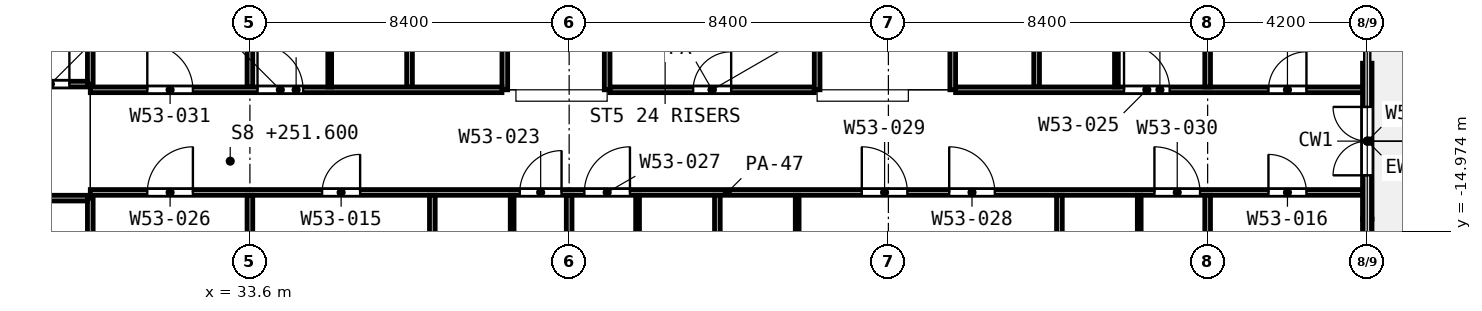
"""IFC4 building model, lengths in metres.
Left out: names, types, materials, properties, quantities, classifications, styles, units other than length and angle.
Written with IfcOpenShell. Run it as: python <this file> out.ifc"""

import sys

from ifc_helpers import new_model, si_unit, direction, frame, frame_2d, origin, place, context, subcontext, project, spatial, rectangle, extrude, element, fill, save


model = new_model("IFC4")
c1 = context("Model", 3, precision=1e-05, world=origin(), true_north=direction((0.0, 1.0)))
c2 = subcontext(c1, "Body", "Model", "MODEL_VIEW")
j1 = project(units=[si_unit("LENGTHUNIT", "METRE"), si_unit("PLANEANGLEUNIT", "RADIAN")], contexts=[c1])
p1 = place(None, origin())
s1 = spatial("IfcSite", under=j1, at=p1, CompositionType="ELEMENT")
p2 = place(p1, origin())
s2 = spatial("IfcBuilding", under=s1, at=p2, CompositionType="ELEMENT")
p3 = place(p2, frame((0.0, 0.0, 251.6)))
s3 = spatial("IfcBuildingStorey", under=s2, at=p3, CompositionType="ELEMENT", Elevation=251.6)
p4 = place(p3, frame((63.0, -18.75, 0.0), z_axis=(0.0, 0.0, 1.0), x_axis=(0.0, 1.0, 0.0)))
e1 = element("IfcWall", 1, at=p4, inside=s3, PredefinedType="SOLIDWALL", context=c2, shape_type="SweptSolid", body=[
    extrude(rectangle(XDim=4.1, YDim=0.25, at=frame_2d((2.05, 0.0))), origin(), (0.0, 0.0, 1.0), 2.58),
])
p5 = place(p4, frame((1.15, 0.0, 0.0)))
e2 = element("IfcOpeningElement", 2, at=p5, cuts=e1, PredefinedType="OPENING", context=c2, shape_type="SweptSolid", body=[
    extrude(rectangle(XDim=1.8, YDim=2.1, at=frame_2d((0.9, 1.05))), frame((0.0, 0.135, 0.0), z_axis=(0.0, -1.0, 0.0), x_axis=(1.0, 0.0, 0.0)), (0.0, 0.0, 1.0), 0.27),
])
p6 = place(p3, frame((63.0, -14.65, 0.0), z_axis=(0.0, 0.0, 1.0), x_axis=(0.0, 1.0, 0.0)))
e3 = element("IfcWall", 3, at=p6, inside=s3, PredefinedType="SOLIDWALL", context=c2, shape_type="SweptSolid", body=[
    extrude(rectangle(XDim=4.1, YDim=0.25, at=frame_2d((2.05, 0.0))), origin(), (0.0, 0.0, 1.0), 2.58),
])
p7 = place(p6, frame((1.15, 0.0, 0.0)))
e4 = element("IfcOpeningElement", 4, at=p7, cuts=e3, PredefinedType="OPENING", context=c2, shape_type="SweptSolid", body=[
    extrude(rectangle(XDim=1.8, YDim=2.1, at=frame_2d((0.9, 1.05))), frame((0.0, 0.135, 0.0), z_axis=(0.0, -1.0, 0.0), x_axis=(1.0, 0.0, 0.0)), (0.0, 0.0, 1.0), 0.27),
])
for number, where, z_axis, x_axis in (
    (5, (35.7, -11.175, 0.0), (0.0, 0.0, 1.0), (0.0, 1.0, 0.0)),
    (6, (40.5, -16.65, 0.0), (0.0, 0.0, 1.0), (0.0, 1.0, 0.0)),
    (7, (43.8, -16.65, 0.0), (0.0, 0.0, 1.0), (0.0, 1.0, 0.0)),
    (8, (48.0, -16.65, 0.0), (0.0, 0.0, 1.0), (0.0, 1.0, 0.0)),
    (9, (56.4, -11.175, 0.0), (0.0, 0.0, 1.0), (0.0, 1.0, 0.0)),
    (10, (57.0, -16.65, 0.0), (0.0, 0.0, 1.0), (0.0, 1.0, 0.0)),
):
    element("IfcWall", number, at=place(p3, frame(where, z_axis=z_axis, x_axis=x_axis)), inside=s3, PredefinedType="PARTITIONING", context=c2, shape_type="SweptSolid", body=[
        extrude(rectangle(XDim=2.625, YDim=0.1, at=frame_2d((1.312, 0.0))), origin(), (0.0, 0.0, 1.0), 3.6),
    ])
p8 = place(p3, frame((24.8, -14.1, 0.0), z_axis=(0.0, 0.0, 1.0), x_axis=(1.0, 0.0, 0.0)))
e11 = element("IfcWall", 11, at=p8, inside=s3, PredefinedType="PARTITIONING", context=c2, shape_type="SweptSolid", body=[
    extrude(rectangle(XDim=4.525, YDim=0.15, at=frame_2d((2.262, 0.0))), origin(), (0.0, 0.0, 1.0), 3.6),
])
p9 = place(p8, frame((1.75, 0.0, 0.0)))
e12 = element("IfcOpeningElement", 12, at=p9, cuts=e11, PredefinedType="OPENING", context=c2, shape_type="SweptSolid", body=[
    extrude(rectangle(XDim=1.5, YDim=2.1, at=frame_2d((0.75, 1.05))), frame((0.0, 0.085, 0.0), z_axis=(0.0, -1.0, 0.0), x_axis=(1.0, 0.0, 0.0)), (0.0, 0.0, 1.0), 0.17),
])
p10 = place(p3, frame((29.4, -13.95, 0.0), z_axis=(0.0, 0.0, 1.0), x_axis=(1.0, 0.0, 0.0)))
e13 = element("IfcWall", 13, at=p10, inside=s3, PredefinedType="PARTITIONING", context=c2, shape_type="SweptSolid", body=[
    extrude(rectangle(XDim=33.52, YDim=0.15, at=frame_2d((16.76, 0.0))), origin(), (0.0, 0.0, 1.0), 2.7),
])
p11 = place(p10, frame((1.5, 0.0, 0.0)))
e14 = element("IfcOpeningElement", 14, at=p11, cuts=e13, PredefinedType="OPENING", context=c2, shape_type="SweptSolid", body=[
    extrude(rectangle(XDim=1.2, YDim=2.1, at=frame_2d((0.6, 1.05))), frame((0.0, 0.085, 0.0), z_axis=(0.0, -1.0, 0.0), x_axis=(1.0, 0.0, 0.0)), (0.0, 0.0, 1.0), 0.17),
])
p12 = place(p10, frame((6.1, 0.0, 0.0)))
e15 = element("IfcOpeningElement", 15, at=p12, cuts=e13, PredefinedType="OPENING", context=c2, shape_type="SweptSolid", body=[
    extrude(rectangle(XDim=1.0, YDim=2.1, at=frame_2d((0.5, 1.05))), frame((0.0, 0.085, 0.0), z_axis=(0.0, -1.0, 0.0), x_axis=(1.0, 0.0, 0.0)), (0.0, 0.0, 1.0), 0.17),
])
p13 = place(p10, frame((11.3, 0.0, 0.0)))
e16 = element("IfcOpeningElement", 16, at=p13, cuts=e13, PredefinedType="OPENING", context=c2, shape_type="SweptSolid", body=[
    extrude(rectangle(XDim=1.1, YDim=2.1, at=frame_2d((0.55, 1.05))), frame((0.0, 0.085, 0.0), z_axis=(0.0, -1.0, 0.0), x_axis=(1.0, 0.0, 0.0)), (0.0, 0.0, 1.0), 0.17),
])
p14 = place(p10, frame((13.0, 0.0, 0.0)))
e17 = element("IfcOpeningElement", 17, at=p14, cuts=e13, PredefinedType="OPENING", context=c2, shape_type="SweptSolid", body=[
    extrude(rectangle(XDim=1.2, YDim=2.1, at=frame_2d((0.6, 1.05))), frame((0.0, 0.085, 0.0), z_axis=(0.0, -1.0, 0.0), x_axis=(1.0, 0.0, 0.0)), (0.0, 0.0, 1.0), 0.17),
])
p15 = place(p10, frame((22.6, 0.0, 0.0)))
e18 = element("IfcOpeningElement", 18, at=p15, cuts=e13, PredefinedType="OPENING", context=c2, shape_type="SweptSolid", body=[
    extrude(rectangle(XDim=1.2, YDim=2.1, at=frame_2d((0.6, 1.05))), frame((0.0, 0.085, 0.0), z_axis=(0.0, -1.0, 0.0), x_axis=(1.0, 0.0, 0.0)), (0.0, 0.0, 1.0), 0.17),
])
p16 = place(p10, frame((20.3, 0.0, 0.0)))
e19 = element("IfcOpeningElement", 19, at=p16, cuts=e13, PredefinedType="OPENING", context=c2, shape_type="SweptSolid", body=[
    extrude(rectangle(XDim=1.2, YDim=2.1, at=frame_2d((0.6, 1.05))), frame((0.0, 0.085, 0.0), z_axis=(0.0, -1.0, 0.0), x_axis=(1.0, 0.0, 0.0)), (0.0, 0.0, 1.0), 0.17),
])
p17 = place(p10, frame((28.0, 0.0, 0.0)))
e20 = element("IfcOpeningElement", 20, at=p17, cuts=e13, PredefinedType="OPENING", context=c2, shape_type="SweptSolid", body=[
    extrude(rectangle(XDim=1.2, YDim=2.1, at=frame_2d((0.6, 1.05))), frame((0.0, 0.085, 0.0), z_axis=(0.0, -1.0, 0.0), x_axis=(1.0, 0.0, 0.0)), (0.0, 0.0, 1.0), 0.17),
])
p18 = place(p10, frame((31.0, 0.0, 0.0)))
e21 = element("IfcOpeningElement", 21, at=p18, cuts=e13, PredefinedType="OPENING", context=c2, shape_type="SweptSolid", body=[
    extrude(rectangle(XDim=1.0, YDim=2.1, at=frame_2d((0.5, 1.05))), frame((0.0, 0.085, 0.0), z_axis=(0.0, -1.0, 0.0), x_axis=(1.0, 0.0, 0.0)), (0.0, 0.0, 1.0), 0.17),
])
p19 = place(p3, frame((29.4, -11.25, 0.0), z_axis=(0.0, 0.0, 1.0), x_axis=(1.0, 0.0, 0.0)))
e22 = element("IfcWall", 22, at=p19, inside=s3, PredefinedType="PARTITIONING", context=c2, shape_type="SweptSolid", body=[
    extrude(rectangle(XDim=10.832, YDim=0.15, at=frame_2d((5.416, 0.0))), origin(), (0.0, 0.0, 1.0), 3.6),
])
p20 = place(p19, frame((4.4, 0.0, 0.0)))
e23 = element("IfcOpeningElement", 23, at=p20, cuts=e22, PredefinedType="OPENING", context=c2, shape_type="SweptSolid", body=[
    extrude(rectangle(XDim=1.2, YDim=2.1, at=frame_2d((0.6, 1.05))), frame((0.0, 0.085, 0.0), z_axis=(0.0, -1.0, 0.0), x_axis=(1.0, 0.0, 0.0)), (0.0, 0.0, 1.0), 0.17),
])
p21 = place(p19, frame((1.5, 0.0, 0.0)))
e24 = element("IfcOpeningElement", 24, at=p21, cuts=e22, PredefinedType="OPENING", context=c2, shape_type="SweptSolid", body=[
    extrude(rectangle(XDim=1.2, YDim=2.1, at=frame_2d((0.6, 1.05))), frame((0.0, 0.085, 0.0), z_axis=(0.0, -1.0, 0.0), x_axis=(1.0, 0.0, 0.0)), (0.0, 0.0, 1.0), 0.17),
])
p22 = place(p3, frame((43.075, -11.25, 0.0), z_axis=(0.0, 0.0, 1.0), x_axis=(1.0, 0.0, 0.0)))
e25 = element("IfcWall", 25, at=p22, inside=s3, PredefinedType="PARTITIONING", context=c2, shape_type="SweptSolid", body=[
    extrude(rectangle(XDim=5.375, YDim=0.15, at=frame_2d((2.688, 0.0))), origin(), (0.0, 0.0, 1.0), 3.6),
])
p23 = place(p22, frame((2.188, 0.0, 0.0)))
e26 = element("IfcOpeningElement", 26, at=p23, cuts=e25, PredefinedType="OPENING", context=c2, shape_type="SweptSolid", body=[
    extrude(rectangle(XDim=1.0, YDim=2.1, at=frame_2d((0.5, 1.05))), frame((0.0, 0.085, 0.0), z_axis=(0.0, -1.0, 0.0), x_axis=(1.0, 0.0, 0.0)), (0.0, 0.0, 1.0), 0.17),
])
p24 = place(p3, frame((52.168, -11.25, 0.0), z_axis=(0.0, 0.0, 1.0), x_axis=(1.0, 0.0, 0.0)))
e27 = element("IfcWall", 27, at=p24, inside=s3, PredefinedType="PARTITIONING", context=c2, shape_type="SweptSolid", body=[
    extrude(rectangle(XDim=10.752, YDim=0.15, at=frame_2d((5.376, 0.0))), origin(), (0.0, 0.0, 1.0), 2.7),
])
p25 = place(p24, frame((4.432, 0.0, 0.0)))
e28 = element("IfcOpeningElement", 28, at=p25, cuts=e27, PredefinedType="OPENING", context=c2, shape_type="SweptSolid", body=[
    extrude(rectangle(XDim=1.2, YDim=2.1, at=frame_2d((0.6, 1.05))), frame((0.0, 0.085, 0.0), z_axis=(0.0, -1.0, 0.0), x_axis=(1.0, 0.0, 0.0)), (0.0, 0.0, 1.0), 0.17),
])
p26 = place(p24, frame((8.232, 0.0, 0.0)))
e29 = element("IfcOpeningElement", 29, at=p26, cuts=e27, PredefinedType="OPENING", context=c2, shape_type="SweptSolid", body=[
    extrude(rectangle(XDim=1.0, YDim=2.1, at=frame_2d((0.5, 1.05))), frame((0.0, 0.085, 0.0), z_axis=(0.0, -1.0, 0.0), x_axis=(1.0, 0.0, 0.0)), (0.0, 0.0, 1.0), 0.17),
])
p27 = place(p3, frame((24.8, -11.1, 0.0), z_axis=(0.0, 0.0, 1.0), x_axis=(1.0, 0.0, 0.0)))
e30 = element("IfcWall", 30, at=p27, inside=s3, PredefinedType="PARTITIONING", context=c2, shape_type="SweptSolid", body=[
    extrude(rectangle(XDim=4.525, YDim=0.15, at=frame_2d((2.262, 0.0))), origin(), (0.0, 0.0, 1.0), 3.6),
])
p28 = place(p27, frame((1.0, 0.0, 0.0)))
e31 = element("IfcOpeningElement", 31, at=p28, cuts=e30, PredefinedType="OPENING", context=c2, shape_type="SweptSolid", body=[
    extrude(rectangle(XDim=0.9, YDim=2.1, at=frame_2d((0.45, 1.05))), frame((0.0, 0.085, 0.0), z_axis=(0.0, -1.0, 0.0), x_axis=(1.0, 0.0, 0.0)), (0.0, 0.0, 1.0), 0.17),
])
p29 = place(p27, frame((3.05, 0.0, 0.0)))
e32 = element("IfcOpeningElement", 32, at=p29, cuts=e30, PredefinedType="OPENING", context=c2, shape_type="SweptSolid", body=[
    extrude(rectangle(XDim=1.0, YDim=2.1, at=frame_2d((0.5, 1.05))), frame((0.0, 0.085, 0.0), z_axis=(0.0, -1.0, 0.0), x_axis=(1.0, 0.0, 0.0)), (0.0, 0.0, 1.0), 0.17),
])
p30 = place(p3, frame((29.4, -25.2, 0.0), z_axis=(0.0, 0.0, 1.0), x_axis=(0.0, 1.0, 0.0)))
e33 = element("IfcWall", 33, at=p30, inside=s3, PredefinedType="PARTITIONING", context=c2, shape_type="SweptSolid", body=[
    extrude(rectangle(XDim=11.1, YDim=0.15, at=frame_2d((5.55, 0.0))), origin(), (0.0, 0.0, 1.0), 3.6),
])
p31 = place(p3, frame((29.4, -11.1, 0.0), z_axis=(0.0, 0.0, 1.0), x_axis=(0.0, 1.0, 0.0)))
e34 = element("IfcWall", 34, at=p31, inside=s3, PredefinedType="PARTITIONING", context=c2, shape_type="SweptSolid", body=[
    extrude(rectangle(XDim=11.02, YDim=0.15, at=frame_2d((5.51, 0.0))), origin(), (0.0, 0.0, 1.0), 3.6),
])
p32 = place(p3, frame((33.6, -25.12, 0.0), z_axis=(0.0, 0.0, 1.0), x_axis=(0.0, 1.0, 0.0)))
e35 = element("IfcWall", 35, at=p32, inside=s3, PredefinedType="PARTITIONING", context=c2, shape_type="SweptSolid", body=[
    extrude(rectangle(XDim=11.095, YDim=0.15, at=frame_2d((5.548, 0.0))), origin(), (0.0, 0.0, 1.0), 3.6),
])
for number, where, z_axis, x_axis in (
    (36, (33.6, -11.175, 0.0), (0.0, 0.0, 1.0), (0.0, 1.0, 0.0)),
    (37, (37.8, -11.175, 0.0), (0.0, 0.0, 1.0), (0.0, 1.0, 0.0)),
):
    element("IfcWall", number, at=place(p3, frame(where, z_axis=z_axis, x_axis=x_axis)), inside=s3, PredefinedType="PARTITIONING", context=c2, shape_type="SweptSolid", body=[
        extrude(rectangle(XDim=11.095, YDim=0.15, at=frame_2d((5.547, 0.0))), origin(), (0.0, 0.0, 1.0), 3.6),
    ])
p33 = place(p3, frame((38.4, -25.12, 0.0), z_axis=(0.0, 0.0, 1.0), x_axis=(0.0, 1.0, 0.0)))
e38 = element("IfcWall", 38, at=p33, inside=s3, PredefinedType="PARTITIONING", context=c2, shape_type="SweptSolid", body=[
    extrude(rectangle(XDim=11.095, YDim=0.15, at=frame_2d((5.548, 0.0))), origin(), (0.0, 0.0, 1.0), 3.6),
])
p34 = place(p3, frame((40.307, -11.25, 0.0), z_axis=(0.0, 0.0, 1.0), x_axis=(0.0, 1.0, 0.0)))
e39 = element("IfcWall", 39, at=p34, inside=s3, PredefinedType="PARTITIONING", context=c2, shape_type="SweptSolid", body=[
    extrude(rectangle(XDim=11.17, YDim=0.15, at=frame_2d((5.585, 0.0))), origin(), (0.0, 0.0, 1.0), 3.6),
])
p35 = place(p34, frame((5.125, 0.0, 0.0)))
e40 = element("IfcOpeningElement", 40, at=p35, cuts=e39, PredefinedType="OPENING", context=c2, shape_type="SweptSolid", body=[
    extrude(rectangle(XDim=1.0, YDim=2.1, at=frame_2d((0.5, 1.05))), frame((0.0, 0.085, 0.0), z_axis=(0.0, -1.0, 0.0), x_axis=(1.0, 0.0, 0.0)), (0.0, 0.0, 1.0), 0.17),
])
p36 = place(p3, frame((42.0, -25.12, 0.0), z_axis=(0.0, 0.0, 1.0), x_axis=(0.0, 1.0, 0.0)))
e41 = element("IfcWall", 41, at=p36, inside=s3, PredefinedType="PARTITIONING", context=c2, shape_type="SweptSolid", body=[
    extrude(rectangle(XDim=11.095, YDim=0.15, at=frame_2d((5.548, 0.0))), origin(), (0.0, 0.0, 1.0), 3.6),
])
p37 = place(p3, frame((43.0, -11.25, 0.0), z_axis=(0.0, 0.0, 1.0), x_axis=(0.0, 1.0, 0.0)))
e42 = element("IfcWall", 42, at=p37, inside=s3, PredefinedType="PARTITIONING", context=c2, shape_type="SweptSolid", body=[
    extrude(rectangle(XDim=2.398, YDim=0.15, at=frame_2d((1.199, 0.0))), origin(), (0.0, 0.0, 1.0), 3.6),
])
p38 = place(p3, frame((45.9, -25.12, 0.0), z_axis=(0.0, 0.0, 1.0), x_axis=(0.0, 1.0, 0.0)))
e43 = element("IfcWall", 43, at=p38, inside=s3, PredefinedType="PARTITIONING", context=c2, shape_type="SweptSolid", body=[
    extrude(rectangle(XDim=11.095, YDim=0.15, at=frame_2d((5.548, 0.0))), origin(), (0.0, 0.0, 1.0), 3.6),
])
p39 = place(p3, frame((48.525, -11.25, 0.0), z_axis=(0.0, 0.0, 1.0), x_axis=(0.0, 1.0, 0.0)))
e44 = element("IfcWall", 44, at=p39, inside=s3, PredefinedType="PARTITIONING", context=c2, shape_type="SweptSolid", body=[
    extrude(rectangle(XDim=2.6, YDim=0.15, at=frame_2d((1.3, 0.0))), origin(), (0.0, 0.0, 1.0), 3.6),
])
p40 = place(p3, frame((52.093, -11.25, 0.0), z_axis=(0.0, 0.0, 1.0), x_axis=(0.0, 1.0, 0.0)))
e45 = element("IfcWall", 45, at=p40, inside=s3, PredefinedType="PARTITIONING", context=c2, shape_type="SweptSolid", body=[
    extrude(rectangle(XDim=9.397, YDim=0.15, at=frame_2d((4.698, 0.0))), origin(), (0.0, 0.0, 1.0), 3.6),
])
p41 = place(p40, frame((4.199, 0.0, 0.0)))
e46 = element("IfcOpeningElement", 46, at=p41, cuts=e45, PredefinedType="OPENING", context=c2, shape_type="SweptSolid", body=[
    extrude(rectangle(XDim=1.0, YDim=2.1, at=frame_2d((0.5, 1.05))), frame((0.0, 0.085, 0.0), z_axis=(0.0, -1.0, 0.0), x_axis=(1.0, 0.0, 0.0)), (0.0, 0.0, 1.0), 0.17),
])
p42 = place(p3, frame((54.3, -11.175, 0.0), z_axis=(0.0, 0.0, 1.0), x_axis=(0.0, 1.0, 0.0)))
e47 = element("IfcWall", 47, at=p42, inside=s3, PredefinedType="PARTITIONING", context=c2, shape_type="SweptSolid", body=[
    extrude(rectangle(XDim=11.095, YDim=0.15, at=frame_2d((5.547, 0.0))), origin(), (0.0, 0.0, 1.0), 3.6),
])
p43 = place(p3, frame((54.9, -25.12, 0.0), z_axis=(0.0, 0.0, 1.0), x_axis=(0.0, 1.0, 0.0)))
e48 = element("IfcWall", 48, at=p43, inside=s3, PredefinedType="PARTITIONING", context=c2, shape_type="SweptSolid", body=[
    extrude(rectangle(XDim=11.095, YDim=0.15, at=frame_2d((5.548, 0.0))), origin(), (0.0, 0.0, 1.0), 3.6),
])
p44 = place(p3, frame((58.8, -23.287, 0.0), z_axis=(0.0, 0.0, 1.0), x_axis=(0.0, 1.0, 0.0)))
e49 = element("IfcWall", 49, at=p44, inside=s3, PredefinedType="PARTITIONING", context=c2, shape_type="SweptSolid", body=[
    extrude(rectangle(XDim=9.262, YDim=0.15, at=frame_2d((4.631, 0.0))), origin(), (0.0, 0.0, 1.0), 2.7),
])
p45 = place(p3, frame((58.8, -11.175, 0.0), z_axis=(0.0, 0.0, 1.0), x_axis=(0.0, 1.0, 0.0)))
e50 = element("IfcWall", 50, at=p45, inside=s3, PredefinedType="PARTITIONING", context=c2, shape_type="SweptSolid", body=[
    extrude(rectangle(XDim=9.262, YDim=0.15, at=frame_2d((4.631, 0.0))), origin(), (0.0, 0.0, 1.0), 2.7),
])
p46 = place(p7, origin())
e51 = element("IfcDoor", 51, at=p46, inside=s3, OperationType="DOUBLE_DOOR_SINGLE_SWING", PredefinedType="DOOR", context=c2, shape_type="SweptSolid", body=[
    extrude(rectangle(XDim=1.8, YDim=2.1, at=frame_2d((0.9, 1.05))), frame((0.0, 0.025, 0.0), z_axis=(0.0, -1.0, 0.0), x_axis=(1.0, 0.0, 0.0)), (0.0, 0.0, 1.0), 0.05),
])
fill(e4, e51)
p47 = place(p20, origin())
e52 = element("IfcDoor", 52, at=p47, inside=s3, OperationType="SINGLE_SWING_LEFT", PredefinedType="DOOR", context=c2, shape_type="SweptSolid", body=[
    extrude(rectangle(XDim=1.2, YDim=2.1, at=frame_2d((0.6, 1.05))), frame((0.0, 0.025, 0.0), z_axis=(0.0, -1.0, 0.0), x_axis=(1.0, 0.0, 0.0)), (0.0, 0.0, 1.0), 0.05),
])
fill(e23, e52)
p48 = place(p23, origin())
e53 = element("IfcDoor", 53, at=p48, inside=s3, OperationType="SINGLE_SWING_RIGHT", PredefinedType="DOOR", context=c2, shape_type="SweptSolid", body=[
    extrude(rectangle(XDim=1.0, YDim=2.1, at=frame_2d((0.5, 1.05))), frame((0.0, 0.025, 0.0), z_axis=(0.0, -1.0, 0.0), x_axis=(1.0, 0.0, 0.0)), (0.0, 0.0, 1.0), 0.05),
])
fill(e26, e53)
p49 = place(p25, origin())
e54 = element("IfcDoor", 54, at=p49, inside=s3, OperationType="SINGLE_SWING_LEFT", PredefinedType="DOOR", context=c2, shape_type="SweptSolid", body=[
    extrude(rectangle(XDim=1.2, YDim=2.1, at=frame_2d((0.6, 1.05))), frame((0.0, 0.025, 0.0), z_axis=(0.0, -1.0, 0.0), x_axis=(1.0, 0.0, 0.0)), (0.0, 0.0, 1.0), 0.05),
])
fill(e28, e54)
p50 = place(p26, origin())
e55 = element("IfcDoor", 55, at=p50, inside=s3, OperationType="SINGLE_SWING_RIGHT", PredefinedType="DOOR", context=c2, shape_type="SweptSolid", body=[
    extrude(rectangle(XDim=1.0, YDim=2.1, at=frame_2d((0.5, 1.05))), frame((0.0, 0.025, 0.0), z_axis=(0.0, -1.0, 0.0), x_axis=(1.0, 0.0, 0.0)), (0.0, 0.0, 1.0), 0.05),
])
fill(e29, e55)
p51 = place(p11, origin())
e56 = element("IfcDoor", 56, at=p51, inside=s3, OperationType="SINGLE_SWING_RIGHT", PredefinedType="DOOR", context=c2, shape_type="SweptSolid", body=[
    extrude(rectangle(XDim=1.2, YDim=2.1, at=frame_2d((0.6, 1.05))), frame((0.0, 0.025, 0.0), z_axis=(0.0, -1.0, 0.0), x_axis=(1.0, 0.0, 0.0)), (0.0, 0.0, 1.0), 0.05),
])
fill(e14, e56)
p52 = place(p12, origin())
e57 = element("IfcDoor", 57, at=p52, inside=s3, OperationType="SINGLE_SWING_RIGHT", PredefinedType="DOOR", context=c2, shape_type="SweptSolid", body=[
    extrude(rectangle(XDim=1.0, YDim=2.1, at=frame_2d((0.5, 1.05))), frame((0.0, 0.025, 0.0), z_axis=(0.0, -1.0, 0.0), x_axis=(1.0, 0.0, 0.0)), (0.0, 0.0, 1.0), 0.05),
])
fill(e15, e57)
p53 = place(p13, origin())
e58 = element("IfcDoor", 58, at=p53, inside=s3, OperationType="SINGLE_SWING_RIGHT", PredefinedType="DOOR", context=c2, shape_type="SweptSolid", body=[
    extrude(rectangle(XDim=1.1, YDim=2.1, at=frame_2d((0.55, 1.05))), frame((0.0, 0.025, 0.0), z_axis=(0.0, -1.0, 0.0), x_axis=(1.0, 0.0, 0.0)), (0.0, 0.0, 1.0), 0.05),
])
fill(e16, e58)
p54 = place(p14, origin())
e59 = element("IfcDoor", 59, at=p54, inside=s3, OperationType="SINGLE_SWING_RIGHT", PredefinedType="DOOR", context=c2, shape_type="SweptSolid", body=[
    extrude(rectangle(XDim=1.2, YDim=2.1, at=frame_2d((0.6, 1.05))), frame((0.0, 0.025, 0.0), z_axis=(0.0, -1.0, 0.0), x_axis=(1.0, 0.0, 0.0)), (0.0, 0.0, 1.0), 0.05),
])
fill(e17, e59)
p55 = place(p15, origin())
e60 = element("IfcDoor", 60, at=p55, inside=s3, OperationType="SINGLE_SWING_LEFT", PredefinedType="DOOR", context=c2, shape_type="SweptSolid", body=[
    extrude(rectangle(XDim=1.2, YDim=2.1, at=frame_2d((0.6, 1.05))), frame((0.0, 0.025, 0.0), z_axis=(0.0, -1.0, 0.0), x_axis=(1.0, 0.0, 0.0)), (0.0, 0.0, 1.0), 0.05),
])
fill(e18, e60)
p56 = place(p16, origin())
e61 = element("IfcDoor", 61, at=p56, inside=s3, OperationType="SINGLE_SWING_LEFT", PredefinedType="DOOR", context=c2, shape_type="SweptSolid", body=[
    extrude(rectangle(XDim=1.2, YDim=2.1, at=frame_2d((0.6, 1.05))), frame((0.0, 0.025, 0.0), z_axis=(0.0, -1.0, 0.0), x_axis=(1.0, 0.0, 0.0)), (0.0, 0.0, 1.0), 0.05),
])
fill(e19, e61)
p57 = place(p17, origin())
e62 = element("IfcDoor", 62, at=p57, inside=s3, OperationType="SINGLE_SWING_LEFT", PredefinedType="DOOR", context=c2, shape_type="SweptSolid", body=[
    extrude(rectangle(XDim=1.2, YDim=2.1, at=frame_2d((0.6, 1.05))), frame((0.0, 0.025, 0.0), z_axis=(0.0, -1.0, 0.0), x_axis=(1.0, 0.0, 0.0)), (0.0, 0.0, 1.0), 0.05),
])
fill(e20, e62)
p58 = place(p18, origin())
e63 = element("IfcDoor", 63, at=p58, inside=s3, OperationType="SINGLE_SWING_LEFT", PredefinedType="DOOR", context=c2, shape_type="SweptSolid", body=[
    extrude(rectangle(XDim=1.0, YDim=2.1, at=frame_2d((0.5, 1.05))), frame((0.0, 0.025, 0.0), z_axis=(0.0, -1.0, 0.0), x_axis=(1.0, 0.0, 0.0)), (0.0, 0.0, 1.0), 0.05),
])
fill(e21, e63)
p59 = place(p29, origin())
e64 = element("IfcDoor", 64, at=p59, inside=s3, OperationType="SINGLE_SWING_RIGHT", PredefinedType="DOOR", context=c2, shape_type="SweptSolid", body=[
    extrude(rectangle(XDim=1.0, YDim=2.1, at=frame_2d((0.5, 1.05))), frame((0.0, 0.025, 0.0), z_axis=(0.0, -1.0, 0.0), x_axis=(1.0, 0.0, 0.0)), (0.0, 0.0, 1.0), 0.05),
])
fill(e32, e64)
p60 = place(p21, origin())
e65 = element("IfcDoor", 65, at=p60, inside=s3, OperationType="SINGLE_SWING_LEFT", PredefinedType="DOOR", context=c2, shape_type="SweptSolid", body=[
    extrude(rectangle(XDim=1.2, YDim=2.1, at=frame_2d((0.6, 1.05))), frame((0.0, 0.025, 0.0), z_axis=(0.0, -1.0, 0.0), x_axis=(1.0, 0.0, 0.0)), (0.0, 0.0, 1.0), 0.05),
])
fill(e24, e65)
save(model, sys.argv[1])
